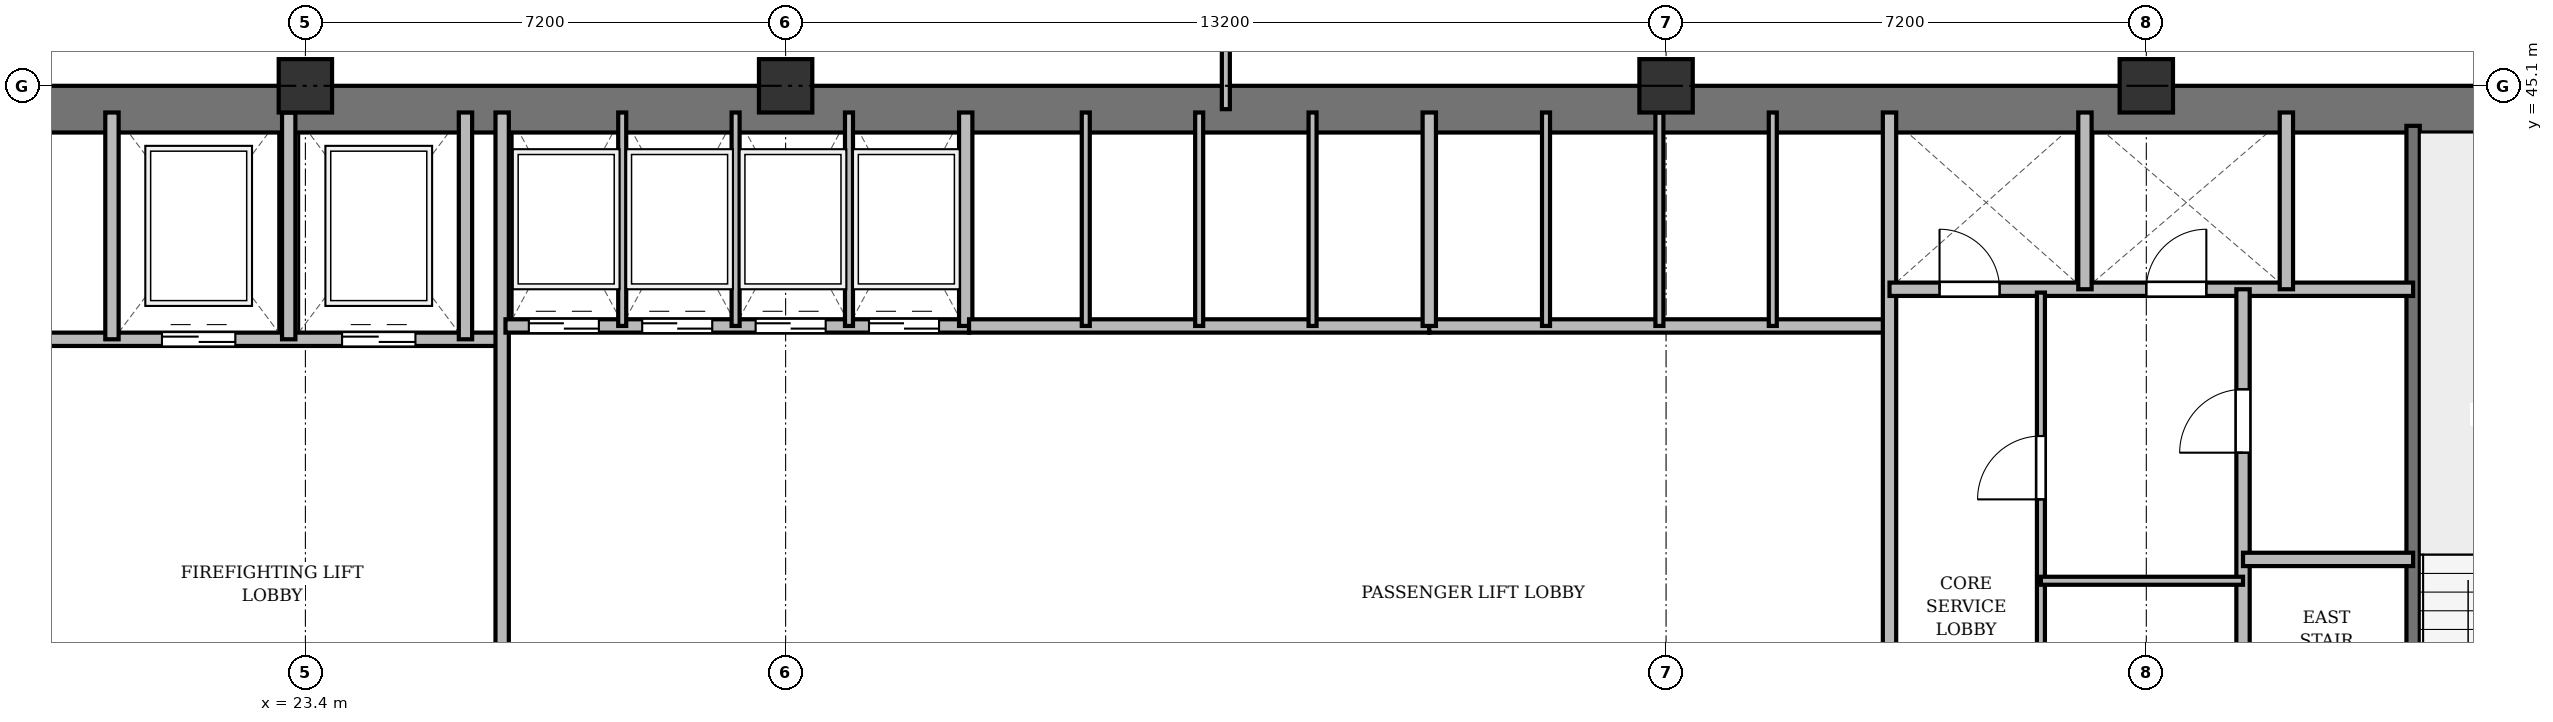
"""IFC4 building model, lengths in metres.
Left out: names, types, materials, properties, quantities, classifications, styles, units other than length and angle.
Written with IfcOpenShell. Run it as: python <this file> out.ifc"""

import sys

from ifc_helpers import new_model, si_unit, direction, frame, frame_2d, origin, origin_2d, place, context, subcontext, project, spatial, rectangle, extrude, source, transform, mapped, element, fill, save


model = new_model("IFC4")
c1 = context("Model", 3, precision=1e-05, world=origin(), true_north=direction((0.0, 1.0)))
c2 = subcontext(c1, "Body", "Model", "MODEL_VIEW")
j1 = project(units=[si_unit("LENGTHUNIT", "METRE"), si_unit("PLANEANGLEUNIT", "RADIAN")], contexts=[c1])
p1 = place(None, origin())
s1 = spatial("IfcSite", under=j1, at=p1, CompositionType="ELEMENT")
p2 = place(p1, origin())
s2 = spatial("IfcBuilding", under=s1, at=p2, CompositionType="ELEMENT")
p3 = place(p2, frame((0.0, 0.0, 106.9)))
s3 = spatial("IfcBuildingStorey", under=s2, at=p3, CompositionType="ELEMENT", Elevation=106.9)
m1 = source(origin(), c2, "Body", "SweptSolid", [
    extrude(rectangle(XDim=0.8, YDim=0.8, at=origin_2d()), origin(), (0.0, 0.0, 1.0), 3.6),
])
for number, where, z_axis, x_axis in (
    (1, (23.4, 45.1, 0.0), (0.0, 0.0, 1.0), (1.0, 0.0, 0.0)),
    (2, (30.6, 45.1, 0.0), (0.0, 0.0, 1.0), (1.0, 0.0, 0.0)),
    (3, (43.8, 45.1, 0.0), (0.0, 0.0, 1.0), (1.0, 0.0, 0.0)),
    (4, (51.0, 45.1, 0.0), (0.0, 0.0, 1.0), (1.0, 0.0, 0.0)),
):
    element("IfcColumn", number, at=place(p3, frame(where, z_axis=z_axis, x_axis=x_axis)), inside=s3, PredefinedType="COLUMN", context=c2, shape_type="MappedRepresentation", body=[
        mapped(m1, transform((0.0, 0.0, 0.0), x_axis=(1.0, 0.0, 0.0), y_axis=(0.0, 1.0, 0.0), z_axis=(0.0, 0.0, 1.0), scale=1.0)),
    ])
p4 = place(p3, frame((15.5, 44.75, 0.0), z_axis=(0.0, 0.0, 1.0), x_axis=(1.0, 0.0, 0.0)))
e5 = element("IfcWall", 5, at=p4, inside=s3, PredefinedType="SHEAR", context=c2, shape_type="SweptSolid", body=[
    extrude(rectangle(XDim=43.4, YDim=0.7, at=frame_2d((21.7, 0.0))), origin(), (0.0, 0.0, 1.0), 3.34),
])
p5 = place(p3, frame((55.0, 33.4, 0.0), z_axis=(0.0, 0.0, 1.0), x_axis=(0.0, 1.0, 0.0)))
e6 = element("IfcWall", 6, at=p5, inside=s3, PredefinedType="SHEAR", context=c2, shape_type="SweptSolid", body=[
    extrude(rectangle(XDim=11.1, YDim=0.2, at=frame_2d((5.55, 0.0))), origin(), (0.0, 0.0, 1.0), 3.34),
])
p6 = place(p5, frame((0.85, 0.0, 0.0)))
e7 = element("IfcOpeningElement", 7, at=p6, cuts=e6, PredefinedType="OPENING", context=c2, shape_type="SweptSolid", body=[
    extrude(rectangle(XDim=1.1, YDim=2.15, at=frame_2d((0.55, 1.075))), frame((0.0, 0.11, 0.0), z_axis=(0.0, -1.0, 0.0), x_axis=(1.0, 0.0, 0.0)), (0.0, 0.0, 1.0), 0.22),
])
p7 = place(p3, frame((19.55, 41.3, 0.0), z_axis=(0.0, 0.0, 1.0), x_axis=(1.0, 0.0, 0.0)))
e8 = element("IfcWall", 8, at=p7, inside=s3, PredefinedType="SOLIDWALL", context=c2, shape_type="SweptSolid", body=[
    extrude(rectangle(XDim=6.75, YDim=0.2, at=frame_2d((3.375, 0.0))), origin(), (0.0, 0.0, 1.0), 3.34),
])
p8 = place(p7, frame((1.7, 0.0, 0.0)))
e9 = element("IfcOpeningElement", 9, at=p8, cuts=e8, PredefinedType="OPENING", context=c2, shape_type="SweptSolid", body=[
    extrude(rectangle(XDim=1.1, YDim=2.15, at=frame_2d((0.55, 1.075))), frame((0.0, 0.11, 0.0), z_axis=(0.0, -1.0, 0.0), x_axis=(1.0, 0.0, 0.0)), (0.0, 0.0, 1.0), 0.22),
])
p9 = place(p7, frame((4.4, 0.0, 0.0)))
e10 = element("IfcOpeningElement", 10, at=p9, cuts=e8, PredefinedType="OPENING", context=c2, shape_type="SweptSolid", body=[
    extrude(rectangle(XDim=1.1, YDim=2.15, at=frame_2d((0.55, 1.075))), frame((0.0, 0.11, 0.0), z_axis=(0.0, -1.0, 0.0), x_axis=(1.0, 0.0, 0.0)), (0.0, 0.0, 1.0), 0.22),
])
for number, where, z_axis, x_axis in (
    (11, (20.5, 41.3, 0.0), (0.0, 0.0, 1.0), (0.0, 1.0, 0.0)),
    (12, (23.15, 41.3, 0.0), (0.0, 0.0, 1.0), (0.0, 1.0, 0.0)),
    (13, (25.8, 41.3, 0.0), (0.0, 0.0, 1.0), (0.0, 1.0, 0.0)),
):
    element("IfcWall", number, at=place(p3, frame(where, z_axis=z_axis, x_axis=x_axis)), inside=s3, PredefinedType="SOLIDWALL", context=c2, shape_type="SweptSolid", body=[
        extrude(rectangle(XDim=3.4, YDim=0.2, at=frame_2d((1.7, 0.0))), origin(), (0.0, 0.0, 1.0), 3.34),
    ])
p10 = place(p3, frame((26.35, 33.4, 0.0), z_axis=(0.0, 0.0, 1.0), x_axis=(0.0, 1.0, 0.0)))
e14 = element("IfcWall", 14, at=p10, inside=s3, PredefinedType="SOLIDWALL", context=c2, shape_type="SweptSolid", body=[
    extrude(rectangle(XDim=11.3, YDim=0.2, at=frame_2d((5.65, 0.0))), origin(), (0.0, 0.0, 1.0), 2.752),
])
p11 = place(p3, frame((26.4, 41.5, 0.0), z_axis=(0.0, 0.0, 1.0), x_axis=(1.0, 0.0, 0.0)))
e15 = element("IfcWall", 15, at=p11, inside=s3, PredefinedType="SOLIDWALL", context=c2, shape_type="SweptSolid", body=[
    extrude(rectangle(XDim=6.95, YDim=0.2, at=frame_2d((3.475, 0.0))), origin(), (0.0, 0.0, 1.0), 3.34),
])
p12 = place(p11, frame((0.35, 0.0, 0.0)))
e16 = element("IfcOpeningElement", 16, at=p12, cuts=e15, PredefinedType="OPENING", context=c2, shape_type="SweptSolid", body=[
    extrude(rectangle(XDim=1.05, YDim=2.15, at=frame_2d((0.525, 1.075))), frame((0.0, 0.11, 0.0), z_axis=(0.0, -1.0, 0.0), x_axis=(1.0, 0.0, 0.0)), (0.0, 0.0, 1.0), 0.22),
])
p13 = place(p11, frame((2.05, 0.0, 0.0)))
e17 = element("IfcOpeningElement", 17, at=p13, cuts=e15, PredefinedType="OPENING", context=c2, shape_type="SweptSolid", body=[
    extrude(rectangle(XDim=1.05, YDim=2.15, at=frame_2d((0.525, 1.075))), frame((0.0, 0.11, 0.0), z_axis=(0.0, -1.0, 0.0), x_axis=(1.0, 0.0, 0.0)), (0.0, 0.0, 1.0), 0.22),
])
p14 = place(p11, frame((3.75, 0.0, 0.0)))
e18 = element("IfcOpeningElement", 18, at=p14, cuts=e15, PredefinedType="OPENING", context=c2, shape_type="SweptSolid", body=[
    extrude(rectangle(XDim=1.05, YDim=2.15, at=frame_2d((0.525, 1.075))), frame((0.0, 0.11, 0.0), z_axis=(0.0, -1.0, 0.0), x_axis=(1.0, 0.0, 0.0)), (0.0, 0.0, 1.0), 0.22),
])
p15 = place(p11, frame((5.45, 0.0, 0.0)))
e19 = element("IfcOpeningElement", 19, at=p15, cuts=e15, PredefinedType="OPENING", context=c2, shape_type="SweptSolid", body=[
    extrude(rectangle(XDim=1.05, YDim=2.15, at=frame_2d((0.525, 1.075))), frame((0.0, 0.11, 0.0), z_axis=(0.0, -1.0, 0.0), x_axis=(1.0, 0.0, 0.0)), (0.0, 0.0, 1.0), 0.22),
])
p16 = place(p3, frame((33.3, 41.5, 0.0), z_axis=(0.0, 0.0, 1.0), x_axis=(0.0, 1.0, 0.0)))
e20 = element("IfcWall", 20, at=p16, inside=s3, PredefinedType="SOLIDWALL", context=c2, shape_type="SweptSolid", body=[
    extrude(rectangle(XDim=3.2, YDim=0.2, at=frame_2d((1.6, 0.0))), origin(), (0.0, 0.0, 1.0), 3.34),
])
for number, where, z_axis, x_axis in (
    (21, (28.15, 41.5, 0.0), (0.0, 0.0, 1.0), (0.0, 1.0, 0.0)),
    (22, (29.85, 41.5, 0.0), (0.0, 0.0, 1.0), (0.0, 1.0, 0.0)),
    (23, (31.55, 41.5, 0.0), (0.0, 0.0, 1.0), (0.0, 1.0, 0.0)),
):
    element("IfcWall", number, at=place(p3, frame(where, z_axis=z_axis, x_axis=x_axis)), inside=s3, PredefinedType="PARTITIONING", context=c2, shape_type="SweptSolid", body=[
        extrude(rectangle(XDim=3.2, YDim=0.12, at=frame_2d((1.6, 0.0))), origin(), (0.0, 0.0, 1.0), 3.34),
    ])
p17 = place(p3, frame((33.35, 41.5, 0.0), z_axis=(0.0, 0.0, 1.0), x_axis=(1.0, 0.0, 0.0)))
e24 = element("IfcWall", 24, at=p17, inside=s3, PredefinedType="SOLIDWALL", context=c2, shape_type="SweptSolid", body=[
    extrude(rectangle(XDim=6.9, YDim=0.2, at=frame_2d((3.45, 0.0))), origin(), (0.0, 0.0, 1.0), 3.34),
])
for number, where, z_axis, x_axis in (
    (25, (35.1, 41.5, 0.0), (0.0, 0.0, 1.0), (0.0, 1.0, 0.0)),
    (26, (36.8, 41.5, 0.0), (0.0, 0.0, 1.0), (0.0, 1.0, 0.0)),
    (27, (38.5, 41.5, 0.0), (0.0, 0.0, 1.0), (0.0, 1.0, 0.0)),
):
    element("IfcWall", number, at=place(p3, frame(where, z_axis=z_axis, x_axis=x_axis)), inside=s3, PredefinedType="PARTITIONING", context=c2, shape_type="SweptSolid", body=[
        extrude(rectangle(XDim=3.2, YDim=0.12, at=frame_2d((1.6, 0.0))), origin(), (0.0, 0.0, 1.0), 3.34),
    ])
p18 = place(p3, frame((40.25, 41.5, 0.0), z_axis=(0.0, 0.0, 1.0), x_axis=(1.0, 0.0, 0.0)))
e28 = element("IfcWall", 28, at=p18, inside=s3, PredefinedType="SOLIDWALL", context=c2, shape_type="SweptSolid", body=[
    extrude(rectangle(XDim=6.9, YDim=0.2, at=frame_2d((3.45, 0.0))), origin(), (0.0, 0.0, 1.0), 2.84),
])
p19 = place(p3, frame((40.25, 41.5, 0.0), z_axis=(0.0, 0.0, 1.0), x_axis=(0.0, 1.0, 0.0)))
e29 = element("IfcWall", 29, at=p19, inside=s3, PredefinedType="SOLIDWALL", context=c2, shape_type="SweptSolid", body=[
    extrude(rectangle(XDim=3.2, YDim=0.2, at=frame_2d((1.6, 0.0))), origin(), (0.0, 0.0, 1.0), 3.34),
])
p20 = place(p3, frame((42.0, 41.5, 0.0), z_axis=(0.0, 0.0, 1.0), x_axis=(0.0, 1.0, 0.0)))
e30 = element("IfcWall", 30, at=p20, inside=s3, PredefinedType="PARTITIONING", context=c2, shape_type="SweptSolid", body=[
    extrude(rectangle(XDim=3.2, YDim=0.12, at=frame_2d((1.6, 0.0))), origin(), (0.0, 0.0, 1.0), 3.34),
])
p21 = place(p3, frame((43.7, 41.5, 0.0), z_axis=(0.0, 0.0, 1.0), x_axis=(0.0, 1.0, 0.0)))
e31 = element("IfcWall", 31, at=p21, inside=s3, PredefinedType="PARTITIONING", context=c2, shape_type="SweptSolid", body=[
    extrude(rectangle(XDim=3.2, YDim=0.12, at=frame_2d((1.6, 0.0))), origin(), (0.0, 0.0, 1.0), 2.84),
])
p22 = place(p3, frame((45.4, 41.5, 0.0), z_axis=(0.0, 0.0, 1.0), x_axis=(0.0, 1.0, 0.0)))
e32 = element("IfcWall", 32, at=p22, inside=s3, PredefinedType="PARTITIONING", context=c2, shape_type="SweptSolid", body=[
    extrude(rectangle(XDim=3.2, YDim=0.12, at=frame_2d((1.6, 0.0))), origin(), (0.0, 0.0, 1.0), 3.34),
])
p23 = place(p3, frame((47.15, 33.4, 0.0), z_axis=(0.0, 0.0, 1.0), x_axis=(0.0, 1.0, 0.0)))
e33 = element("IfcWall", 33, at=p23, inside=s3, PredefinedType="SOLIDWALL", context=c2, shape_type="SweptSolid", body=[
    extrude(rectangle(XDim=11.3, YDim=0.2, at=frame_2d((5.65, 0.0))), origin(), (0.0, 0.0, 1.0), 2.752),
])
p24 = place(p3, frame((47.15, 42.05, 0.0), z_axis=(0.0, 0.0, 1.0), x_axis=(1.0, 0.0, 0.0)))
e34 = element("IfcWall", 34, at=p24, inside=s3, PredefinedType="SOLIDWALL", context=c2, shape_type="SweptSolid", body=[
    extrude(rectangle(XDim=7.85, YDim=0.2, at=frame_2d((3.925, 0.0))), origin(), (0.0, 0.0, 1.0), 2.84),
])
p25 = place(p24, frame((0.75, 0.0, 0.0)))
e35 = element("IfcOpeningElement", 35, at=p25, cuts=e34, PredefinedType="OPENING", context=c2, shape_type="SweptSolid", body=[
    extrude(rectangle(XDim=0.9, YDim=2.1, at=frame_2d((0.45, 1.05))), frame((0.0, 0.11, 0.0), z_axis=(0.0, -1.0, 0.0), x_axis=(1.0, 0.0, 0.0)), (0.0, 0.0, 1.0), 0.22),
])
p26 = place(p24, frame((3.85, 0.0, 0.0)))
e36 = element("IfcOpeningElement", 36, at=p26, cuts=e34, PredefinedType="OPENING", context=c2, shape_type="SweptSolid", body=[
    extrude(rectangle(XDim=0.9, YDim=2.1, at=frame_2d((0.45, 1.05))), frame((0.0, 0.11, 0.0), z_axis=(0.0, -1.0, 0.0), x_axis=(1.0, 0.0, 0.0)), (0.0, 0.0, 1.0), 0.22),
])
for number, where, z_axis, x_axis in (
    (37, (50.08, 42.05, 0.0), (0.0, 0.0, 1.0), (0.0, 1.0, 0.0)),
    (38, (53.1, 42.05, 0.0), (0.0, 0.0, 1.0), (0.0, 1.0, 0.0)),
):
    element("IfcWall", number, at=place(p3, frame(where, z_axis=z_axis, x_axis=x_axis)), inside=s3, PredefinedType="SOLIDWALL", context=c2, shape_type="SweptSolid", body=[
        extrude(rectangle(XDim=2.65, YDim=0.2, at=frame_2d((1.325, 0.0))), origin(), (0.0, 0.0, 1.0), 3.34),
    ])
p27 = place(p3, frame((52.45, 33.4, 0.0), z_axis=(0.0, 0.0, 1.0), x_axis=(0.0, 1.0, 0.0)))
e39 = element("IfcWall", 39, at=p27, inside=s3, PredefinedType="PARTITIONING", context=c2, shape_type="SweptSolid", body=[
    extrude(rectangle(XDim=8.65, YDim=0.2, at=frame_2d((4.325, 0.0))), origin(), (0.0, 0.0, 1.0), 2.752),
])
p28 = place(p27, frame((6.2, 0.0, 0.0)))
e40 = element("IfcOpeningElement", 40, at=p28, cuts=e39, PredefinedType="OPENING", context=c2, shape_type="SweptSolid", body=[
    extrude(rectangle(XDim=0.95, YDim=2.15, at=frame_2d((0.475, 1.075))), frame((0.0, 0.11, 0.0), z_axis=(0.0, -1.0, 0.0), x_axis=(1.0, 0.0, 0.0)), (0.0, 0.0, 1.0), 0.22),
])
p29 = place(p3, frame((52.45, 38.0, 0.0), z_axis=(0.0, 0.0, 1.0), x_axis=(1.0, 0.0, 0.0)))
e41 = element("IfcWall", 41, at=p29, inside=s3, PredefinedType="PARTITIONING", context=c2, shape_type="SweptSolid", body=[
    extrude(rectangle(XDim=2.55, YDim=0.2, at=frame_2d((1.275, 0.0))), origin(), (0.0, 0.0, 1.0), 3.34),
])
p30 = place(p3, frame((49.42, 33.4, 0.0), z_axis=(0.0, 0.0, 1.0), x_axis=(0.0, 1.0, 0.0)))
e42 = element("IfcWall", 42, at=p30, inside=s3, PredefinedType="PARTITIONING", context=c2, shape_type="SweptSolid", body=[
    extrude(rectangle(XDim=8.6, YDim=0.12, at=frame_2d((4.3, 0.0))), origin(), (0.0, 0.0, 1.0), 2.752),
])
p31 = place(p30, frame((1.3, 0.0, 0.0)))
e43 = element("IfcOpeningElement", 43, at=p31, cuts=e42, PredefinedType="OPENING", context=c2, shape_type="SweptSolid", body=[
    extrude(rectangle(XDim=0.95, YDim=2.15, at=frame_2d((0.475, 1.075))), frame((0.0, 0.07, 0.0), z_axis=(0.0, -1.0, 0.0), x_axis=(1.0, 0.0, 0.0)), (0.0, 0.0, 1.0), 0.14),
])
p32 = place(p30, frame((5.5, 0.0, 0.0)))
e44 = element("IfcOpeningElement", 44, at=p32, cuts=e42, PredefinedType="OPENING", context=c2, shape_type="SweptSolid", body=[
    extrude(rectangle(XDim=0.95, YDim=2.15, at=frame_2d((0.475, 1.075))), frame((0.0, 0.07, 0.0), z_axis=(0.0, -1.0, 0.0), x_axis=(1.0, 0.0, 0.0)), (0.0, 0.0, 1.0), 0.14),
])
p33 = place(p3, frame((49.42, 37.68, 0.0), z_axis=(0.0, 0.0, 1.0), x_axis=(1.0, 0.0, 0.0)))
e45 = element("IfcWall", 45, at=p33, inside=s3, PredefinedType="PARTITIONING", context=c2, shape_type="SweptSolid", body=[
    extrude(rectangle(XDim=3.03, YDim=0.12, at=frame_2d((1.515, 0.0))), origin(), (0.0, 0.0, 1.0), 2.84),
])
p34 = place(p3, frame((37.2, 44.75, 0.0), z_axis=(0.0, 0.0, 1.0), x_axis=(0.0, 1.0, 0.0)))
e46 = element("IfcWall", 46, at=p34, inside=s3, PredefinedType="PARTITIONING", context=c2, shape_type="SweptSolid", body=[
    extrude(rectangle(XDim=3.61, YDim=0.12, at=frame_2d((1.805, 0.0))), origin(), (0.0, 0.0, 1.0), 2.752),
])
p35 = place(p34, frame((1.1, 0.0, 0.0)))
e47 = element("IfcOpeningElement", 47, at=p35, cuts=e46, PredefinedType="OPENING", context=c2, shape_type="SweptSolid", body=[
    extrude(rectangle(XDim=0.95, YDim=2.15, at=frame_2d((0.475, 1.075))), frame((0.0, 0.07, 0.0), z_axis=(0.0, -1.0, 0.0), x_axis=(1.0, 0.0, 0.0)), (0.0, 0.0, 1.0), 0.14),
])
m2 = source(origin(), c2, "Body", "SweptSolid", [
    extrude(rectangle(XDim=1.1, YDim=2.15, at=frame_2d((0.55, 1.075))), frame((0.0, 0.025, 0.0), z_axis=(0.0, -1.0, 0.0), x_axis=(1.0, 0.0, 0.0)), (0.0, 0.0, 1.0), 0.05),
])
p36 = place(p8, origin())
e48 = element("IfcDoor", 48, at=p36, inside=s3, OperationType="DOUBLE_DOOR_SLIDING", PredefinedType="DOOR", context=c2, shape_type="MappedRepresentation", body=[
    mapped(m2, transform((0.0, 0.0, 0.0), x_axis=(1.0, 0.0, 0.0), y_axis=(0.0, 1.0, 0.0), z_axis=(0.0, 0.0, 1.0), scale=1.0)),
])
fill(e9, e48)
p37 = place(p9, origin())
e49 = element("IfcDoor", 49, at=p37, inside=s3, OperationType="DOUBLE_DOOR_SLIDING", PredefinedType="DOOR", context=c2, shape_type="MappedRepresentation", body=[
    mapped(m2, transform((0.0, 0.0, 0.0), x_axis=(1.0, 0.0, 0.0), y_axis=(0.0, 1.0, 0.0), z_axis=(0.0, 0.0, 1.0), scale=1.0)),
])
fill(e10, e49)
m3 = source(origin(), c2, "Body", "SweptSolid", [
    extrude(rectangle(XDim=1.05, YDim=2.15, at=frame_2d((0.525, 1.075))), frame((0.0, 0.025, 0.0), z_axis=(0.0, -1.0, 0.0), x_axis=(1.0, 0.0, 0.0)), (0.0, 0.0, 1.0), 0.05),
])
p38 = place(p12, origin())
e50 = element("IfcDoor", 50, at=p38, inside=s3, OperationType="DOUBLE_DOOR_SLIDING", PredefinedType="DOOR", context=c2, shape_type="MappedRepresentation", body=[
    mapped(m3, transform((0.0, 0.0, 0.0), x_axis=(1.0, 0.0, 0.0), y_axis=(0.0, 1.0, 0.0), z_axis=(0.0, 0.0, 1.0), scale=1.0)),
])
fill(e16, e50)
p39 = place(p13, origin())
e51 = element("IfcDoor", 51, at=p39, inside=s3, OperationType="DOUBLE_DOOR_SLIDING", PredefinedType="DOOR", context=c2, shape_type="MappedRepresentation", body=[
    mapped(m3, transform((0.0, 0.0, 0.0), x_axis=(1.0, 0.0, 0.0), y_axis=(0.0, 1.0, 0.0), z_axis=(0.0, 0.0, 1.0), scale=1.0)),
])
fill(e17, e51)
p40 = place(p14, origin())
e52 = element("IfcDoor", 52, at=p40, inside=s3, OperationType="DOUBLE_DOOR_SLIDING", PredefinedType="DOOR", context=c2, shape_type="MappedRepresentation", body=[
    mapped(m3, transform((0.0, 0.0, 0.0), x_axis=(1.0, 0.0, 0.0), y_axis=(0.0, 1.0, 0.0), z_axis=(0.0, 0.0, 1.0), scale=1.0)),
])
fill(e18, e52)
p41 = place(p15, origin())
e53 = element("IfcDoor", 53, at=p41, inside=s3, OperationType="DOUBLE_DOOR_SLIDING", PredefinedType="DOOR", context=c2, shape_type="MappedRepresentation", body=[
    mapped(m3, transform((0.0, 0.0, 0.0), x_axis=(1.0, 0.0, 0.0), y_axis=(0.0, 1.0, 0.0), z_axis=(0.0, 0.0, 1.0), scale=1.0)),
])
fill(e19, e53)
m4 = source(origin(), c2, "Body", "SweptSolid", [
    extrude(rectangle(XDim=0.9, YDim=2.1, at=frame_2d((0.45, 1.05))), frame((0.0, 0.025, 0.0), z_axis=(0.0, -1.0, 0.0), x_axis=(1.0, 0.0, 0.0)), (0.0, 0.0, 1.0), 0.05),
])
p42 = place(p25, origin())
e54 = element("IfcDoor", 54, at=p42, inside=s3, OperationType="SINGLE_SWING_LEFT", PredefinedType="DOOR", context=c2, shape_type="MappedRepresentation", body=[
    mapped(m4, transform((0.0, 0.0, 0.0), x_axis=(1.0, 0.0, 0.0), y_axis=(0.0, 1.0, 0.0), z_axis=(0.0, 0.0, 1.0), scale=1.0)),
])
fill(e35, e54)
p43 = place(p26, origin())
e55 = element("IfcDoor", 55, at=p43, inside=s3, OperationType="SINGLE_SWING_RIGHT", PredefinedType="DOOR", context=c2, shape_type="MappedRepresentation", body=[
    mapped(m4, transform((0.0, 0.0, 0.0), x_axis=(1.0, 0.0, 0.0), y_axis=(0.0, 1.0, 0.0), z_axis=(0.0, 0.0, 1.0), scale=1.0)),
])
fill(e36, e55)
m5 = source(origin(), c2, "Body", "SweptSolid", [
    extrude(rectangle(XDim=0.95, YDim=2.15, at=frame_2d((0.475, 1.075))), frame((0.0, 0.025, 0.0), z_axis=(0.0, -1.0, 0.0), x_axis=(1.0, 0.0, 0.0)), (0.0, 0.0, 1.0), 0.05),
])
p44 = place(p28, origin())
e56 = element("IfcDoor", 56, at=p44, inside=s3, OperationType="SINGLE_SWING_LEFT", PredefinedType="DOOR", context=c2, shape_type="MappedRepresentation", body=[
    mapped(m5, transform((0.0, 0.0, 0.0), x_axis=(1.0, 0.0, 0.0), y_axis=(0.0, 1.0, 0.0), z_axis=(0.0, 0.0, 1.0), scale=1.0)),
])
fill(e40, e56)
p45 = place(p32, origin())
e57 = element("IfcDoor", 57, at=p45, inside=s3, OperationType="SINGLE_SWING_LEFT", PredefinedType="DOOR", context=c2, shape_type="MappedRepresentation", body=[
    mapped(m5, transform((0.0, 0.0, 0.0), x_axis=(1.0, 0.0, 0.0), y_axis=(0.0, 1.0, 0.0), z_axis=(0.0, 0.0, 1.0), scale=1.0)),
])
fill(e44, e57)
save(model, sys.argv[1])
